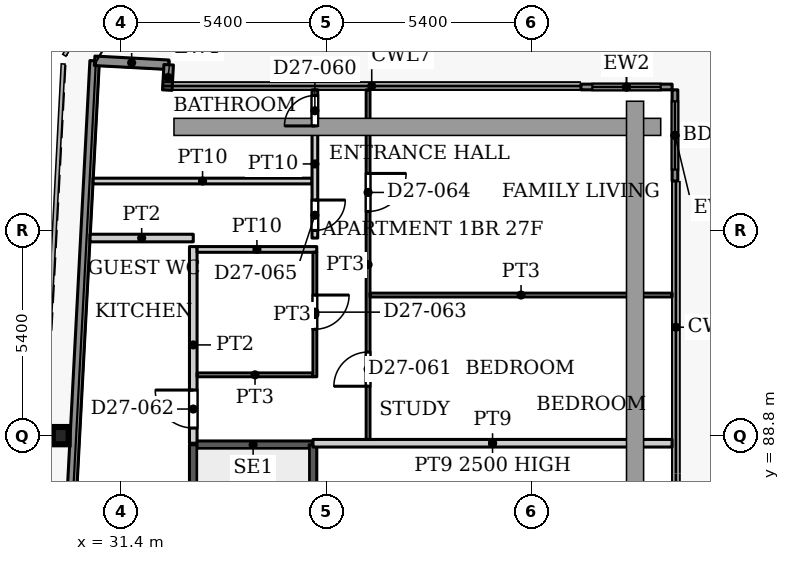
"""IFC4 building model, lengths in metres.
Left out: names, types, materials, properties, quantities, classifications, styles, units other than length and angle.
Written with IfcOpenShell. Run it as: python <this file> out.ifc"""

import sys

from ifc_helpers import new_model, si_unit, direction, frame, frame_2d, origin, origin_2d, place, context, subcontext, project, spatial, rectangle, i_section, extrude, source, transform, mapped, element, fill, save


model = new_model("IFC4")
c1 = context("Model", 3, precision=1e-05, world=origin(), true_north=direction((0.0, 1.0)))
c2 = subcontext(c1, "Body", "Model", "MODEL_VIEW")
j1 = project(units=[si_unit("LENGTHUNIT", "METRE"), si_unit("PLANEANGLEUNIT", "RADIAN")], contexts=[c1])
p1 = place(None, origin())
s1 = spatial("IfcSite", under=j1, at=p1, CompositionType="ELEMENT")
p2 = place(p1, origin())
s2 = spatial("IfcBuilding", under=s1, at=p2, CompositionType="ELEMENT")
p3 = place(p2, frame((0.0, 0.0, 117.5)))
s3 = spatial("IfcBuildingStorey", under=s2, at=p3, CompositionType="ELEMENT", Elevation=117.5)
p4 = place(p3, frame((29.811, 88.8, 0.0), z_axis=(0.0, 0.0, 1.0), x_axis=(1.0, 0.0, 0.0)))
e1 = element("IfcColumn", 1, at=p4, inside=s3, PredefinedType="COLUMN", context=c2, shape_type="SweptSolid", body=[
    extrude(i_section(OverallWidth=0.418, OverallDepth=0.455, WebThickness=0.042, FlangeThickness=0.068, FilletRadius=0.014, at=origin_2d()), origin(), (0.0, 0.0, 1.0), 3.9),
])
p5 = place(p3, frame((27.195, 31.969, 0.0), z_axis=(0.0, 0.0, 1.0), x_axis=(0.052554995867, 0.998618031286, 0.0)))
e2 = element("IfcWall", 2, at=p5, inside=s3, PredefinedType="SOLIDWALL", context=c2, shape_type="SweptSolid", body=[
    extrude(rectangle(XDim=66.787, YDim=0.25, at=frame_2d((33.394, 0.0))), origin(), (0.0, 0.0, 1.0), 3.75),
])
p6 = place(p3, frame((30.705, 98.664, 0.0), z_axis=(0.0, 0.0, 1.0), x_axis=(0.998577785791, -0.053314216913, 0.0)))
e3 = element("IfcWall", 3, at=p6, inside=s3, PredefinedType="SOLIDWALL", context=c2, shape_type="SweptSolid", body=[
    extrude(rectangle(XDim=1.951, YDim=0.25, at=frame_2d((0.975, 0.0))), origin(), (0.0, 0.0, 1.0), 3.75),
])
p7 = place(p3, frame((32.653, 98.56, 0.0), z_axis=(0.0, 0.0, 1.0), x_axis=(-0.054093451632, -0.998535877418, 0.0)))
e4 = element("IfcWall", 4, at=p7, inside=s3, PredefinedType="SOLIDWALL", context=c2, shape_type="SweptSolid", body=[
    extrude(rectangle(XDim=0.668, YDim=0.25, at=frame_2d((0.334, 0.0))), origin(), (0.0, 0.0, 1.0), 3.75),
])
p8 = place(p3, frame((43.5, 97.975, 0.0), z_axis=(0.0, 0.0, 1.0), x_axis=(1.0, 0.0, 0.0)))
e5 = element("IfcWall", 5, at=p8, inside=s3, PredefinedType="SOLIDWALL", context=c2, shape_type="SweptSolid", body=[
    extrude(rectangle(XDim=2.4, YDim=0.15, at=frame_2d((1.2, 0.0))), origin(), (0.0, 0.0, 1.0), 3.75),
])
p9 = place(p8, frame((0.3, 0.0, 0.0)))
e6 = element("IfcOpeningElement", 6, at=p9, cuts=e5, PredefinedType="OPENING", context=c2, shape_type="SweptSolid", body=[
    extrude(rectangle(XDim=1.8, YDim=2.4, at=frame_2d((0.9, 1.2))), frame((0.0, 0.085, 0.0), z_axis=(0.0, -1.0, 0.0), x_axis=(1.0, 0.0, 0.0)), (0.0, 0.0, 1.0), 0.17),
])
p10 = place(p3, frame((45.975, 97.9, 0.0), z_axis=(0.0, 0.0, 1.0), x_axis=(0.0, -1.0, 0.0)))
e7 = element("IfcWall", 7, at=p10, inside=s3, PredefinedType="SOLIDWALL", context=c2, shape_type="SweptSolid", body=[
    extrude(rectangle(XDim=2.4, YDim=0.15, at=frame_2d((1.2, 0.0))), origin(), (0.0, 0.0, 1.0), 3.75),
])
p11 = place(p10, frame((0.3, 0.0, 0.0)))
e8 = element("IfcOpeningElement", 8, at=p11, cuts=e7, PredefinedType="OPENING", context=c2, shape_type="SweptSolid", body=[
    extrude(rectangle(XDim=1.8, YDim=2.4, at=frame_2d((0.9, 1.2))), frame((0.0, 0.085, 0.0), z_axis=(0.0, -1.0, 0.0), x_axis=(1.0, 0.0, 0.0)), (0.0, 0.0, 1.0), 0.17),
])
p12 = place(p3, frame((33.3, 88.56, 0.0), z_axis=(0.0, 0.0, 1.0), x_axis=(1.0, 0.0, 0.0)))
e9 = element("IfcWall", 9, at=p12, inside=s3, PredefinedType="SHEAR", context=c2, shape_type="SweptSolid", body=[
    extrude(rectangle(XDim=3.15, YDim=0.2, at=frame_2d((1.575, 0.0))), origin(), (0.0, 0.0, 1.0), 3.9),
])
p13 = place(p3, frame((33.3, 79.4, 0.0), z_axis=(0.0, 0.0, 1.0), x_axis=(0.0, 1.0, 0.0)))
e10 = element("IfcWall", 10, at=p13, inside=s3, PredefinedType="SHEAR", context=c2, shape_type="SweptSolid", body=[
    extrude(rectangle(XDim=9.16, YDim=0.2, at=frame_2d((4.58, 0.0))), origin(), (0.0, 0.0, 1.0), 3.9),
])
p14 = place(p13, frame((0.35, 0.0, 0.0)))
e11 = element("IfcOpeningElement", 11, at=p14, cuts=e10, PredefinedType="OPENING", context=c2, shape_type="SweptSolid", body=[
    extrude(rectangle(XDim=1.1, YDim=2.2, at=frame_2d((0.55, 1.1))), frame((0.0, 0.11, 0.0), z_axis=(0.0, -1.0, 0.0), x_axis=(1.0, 0.0, 0.0)), (0.0, 0.0, 1.0), 0.22),
])
p15 = place(p3, frame((36.45, 79.4, 0.0), z_axis=(0.0, 0.0, 1.0), x_axis=(0.0, 1.0, 0.0)))
e12 = element("IfcWall", 12, at=p15, inside=s3, PredefinedType="SHEAR", context=c2, shape_type="SweptSolid", body=[
    extrude(rectangle(XDim=9.16, YDim=0.2, at=frame_2d((4.58, 0.0))), origin(), (0.0, 0.0, 1.0), 3.9),
])
p16 = place(p3, frame((30.664, 95.5, 0.0), z_axis=(0.0, 0.0, 1.0), x_axis=(1.0, 0.0, 0.0)))
e13 = element("IfcWall", 13, at=p16, inside=s3, PredefinedType="PARTITIONING", context=c2, shape_type="SweptSolid", body=[
    extrude(rectangle(XDim=5.761, YDim=0.15, at=frame_2d((2.88, 0.0))), origin(), (0.0, 0.0, 1.0), 3.6),
])
p17 = place(p3, frame((30.585, 94.0, 0.0), z_axis=(0.0, 0.0, 1.0), x_axis=(1.0, 0.0, 0.0)))
e14 = element("IfcWall", 14, at=p17, inside=s3, PredefinedType="PARTITIONING", context=c2, shape_type="SweptSolid", body=[
    extrude(rectangle(XDim=2.715, YDim=0.2, at=frame_2d((1.358, 0.0))), origin(), (0.0, 0.0, 1.0), 3.6),
])
p18 = place(p3, frame((33.3, 88.6, 0.0), z_axis=(0.0, 0.0, 1.0), x_axis=(0.0, 1.0, 0.0)))
e15 = element("IfcWall", 15, at=p18, inside=s3, PredefinedType="PARTITIONING", context=c2, shape_type="SweptSolid", body=[
    extrude(rectangle(XDim=5.175, YDim=0.2, at=frame_2d((2.587, 0.0))), origin(), (0.0, 0.0, 1.0), 3.6),
])
p19 = place(p18, frame((0.4, 0.0, 0.0)))
e16 = element("IfcOpeningElement", 16, at=p19, cuts=e15, PredefinedType="OPENING", context=c2, shape_type="SweptSolid", body=[
    extrude(rectangle(XDim=1.0, YDim=2.1, at=frame_2d((0.5, 1.05))), frame((0.0, 0.11, 0.0), z_axis=(0.0, -1.0, 0.0), x_axis=(1.0, 0.0, 0.0)), (0.0, 0.0, 1.0), 0.22),
])
p20 = place(p3, frame((33.4, 90.4, 0.0), z_axis=(0.0, 0.0, 1.0), x_axis=(1.0, 0.0, 0.0)))
e17 = element("IfcWall", 17, at=p20, inside=s3, PredefinedType="PARTITIONING", context=c2, shape_type="SweptSolid", body=[
    extrude(rectangle(XDim=3.05, YDim=0.1, at=frame_2d((1.525, 0.0))), origin(), (0.0, 0.0, 1.0), 3.6),
])
p21 = place(p3, frame((33.4, 93.7, 0.0), z_axis=(0.0, 0.0, 1.0), x_axis=(1.0, 0.0, 0.0)))
e18 = element("IfcWall", 18, at=p21, inside=s3, PredefinedType="PARTITIONING", context=c2, shape_type="SweptSolid", body=[
    extrude(rectangle(XDim=3.15, YDim=0.15, at=frame_2d((1.575, 0.0))), origin(), (0.0, 0.0, 1.0), 3.6),
])
p22 = place(p3, frame((36.45, 88.6, 0.0), z_axis=(0.0, 0.0, 1.0), x_axis=(1.0, 0.0, 0.0)))
e19 = element("IfcWall", 19, at=p22, inside=s3, PredefinedType="PARTITIONING", context=c2, shape_type="SweptSolid", body=[
    extrude(rectangle(XDim=9.45, YDim=0.2, at=frame_2d((4.725, 0.0))), origin(), (0.0, 0.0, 1.0), 2.5),
])
p23 = place(p3, frame((36.5, 90.35, 0.0), z_axis=(0.0, 0.0, 1.0), x_axis=(0.0, 1.0, 0.0)))
e20 = element("IfcWall", 20, at=p23, inside=s3, PredefinedType="PARTITIONING", context=c2, shape_type="SweptSolid", body=[
    extrude(rectangle(XDim=3.275, YDim=0.1, at=frame_2d((1.637, 0.0))), origin(), (0.0, 0.0, 1.0), 3.6),
])
p24 = place(p23, frame((1.25, 0.0, 0.0)))
e21 = element("IfcOpeningElement", 21, at=p24, cuts=e20, PredefinedType="OPENING", context=c2, shape_type="SweptSolid", body=[
    extrude(rectangle(XDim=0.9, YDim=2.1, at=frame_2d((0.45, 1.05))), frame((0.0, 0.06, 0.0), z_axis=(0.0, -1.0, 0.0), x_axis=(1.0, 0.0, 0.0)), (0.0, 0.0, 1.0), 0.12),
])
p25 = place(p3, frame((36.5, 94.0, 0.0), z_axis=(0.0, 0.0, 1.0), x_axis=(0.0, 1.0, 0.0)))
e22 = element("IfcWall", 22, at=p25, inside=s3, PredefinedType="PARTITIONING", context=c2, shape_type="SweptSolid", body=[
    extrude(rectangle(XDim=3.9, YDim=0.15, at=frame_2d((1.95, 0.0))), origin(), (0.0, 0.0, 1.0), 3.6),
])
p26 = place(p25, frame((2.95, 0.0, 0.0)))
e23 = element("IfcOpeningElement", 23, at=p26, cuts=e22, PredefinedType="OPENING", context=c2, shape_type="SweptSolid", body=[
    extrude(rectangle(XDim=0.8, YDim=2.1, at=frame_2d((0.4, 1.05))), frame((0.0, 0.085, 0.0), z_axis=(0.0, -1.0, 0.0), x_axis=(1.0, 0.0, 0.0)), (0.0, 0.0, 1.0), 0.17),
])
p27 = place(p25, frame((0.2, 0.0, 0.0)))
e24 = element("IfcOpeningElement", 24, at=p27, cuts=e22, PredefinedType="OPENING", context=c2, shape_type="SweptSolid", body=[
    extrude(rectangle(XDim=0.8, YDim=2.1, at=frame_2d((0.4, 1.05))), frame((0.0, 0.085, 0.0), z_axis=(0.0, -1.0, 0.0), x_axis=(1.0, 0.0, 0.0)), (0.0, 0.0, 1.0), 0.17),
])
p28 = place(p3, frame((37.9, 88.7, 0.0), z_axis=(0.0, 0.0, 1.0), x_axis=(0.0, 1.0, 0.0)))
e25 = element("IfcWall", 25, at=p28, inside=s3, PredefinedType="PARTITIONING", context=c2, shape_type="SweptSolid", body=[
    extrude(rectangle(XDim=9.2, YDim=0.1, at=frame_2d((4.6, 0.0))), origin(), (0.0, 0.0, 1.0), 3.6),
])
p29 = place(p28, frame((1.4, 0.0, 0.0)))
e26 = element("IfcOpeningElement", 26, at=p29, cuts=e25, PredefinedType="OPENING", context=c2, shape_type="SweptSolid", body=[
    extrude(rectangle(XDim=0.9, YDim=2.1, at=frame_2d((0.45, 1.05))), frame((0.0, 0.06, 0.0), z_axis=(0.0, -1.0, 0.0), x_axis=(1.0, 0.0, 0.0)), (0.0, 0.0, 1.0), 0.12),
])
p30 = place(p28, frame((6.0, 0.0, 0.0)))
e27 = element("IfcOpeningElement", 27, at=p30, cuts=e25, PredefinedType="OPENING", context=c2, shape_type="SweptSolid", body=[
    extrude(rectangle(XDim=1.0, YDim=2.1, at=frame_2d((0.5, 1.05))), frame((0.0, 0.06, 0.0), z_axis=(0.0, -1.0, 0.0), x_axis=(1.0, 0.0, 0.0)), (0.0, 0.0, 1.0), 0.12),
])
p31 = place(p3, frame((37.95, 92.5, 0.0), z_axis=(0.0, 0.0, 1.0), x_axis=(1.0, 0.0, 0.0)))
e28 = element("IfcWall", 28, at=p31, inside=s3, PredefinedType="PARTITIONING", context=c2, shape_type="SweptSolid", body=[
    extrude(rectangle(XDim=7.95, YDim=0.1, at=frame_2d((3.975, 0.0))), origin(), (0.0, 0.0, 1.0), 3.6),
])
m1 = source(origin(), c2, "Body", "SweptSolid", [
    extrude(rectangle(XDim=1.8, YDim=2.4, at=frame_2d((0.9, 1.2))), frame((0.0, 0.025, 0.0), z_axis=(0.0, -1.0, 0.0), x_axis=(1.0, 0.0, 0.0)), (0.0, 0.0, 1.0), 0.05),
])
p32 = place(p9, origin())
e29 = element("IfcDoor", 29, at=p32, inside=s3, OperationType="SLIDING_TO_LEFT", PredefinedType="DOOR", context=c2, shape_type="MappedRepresentation", body=[
    mapped(m1, transform((0.0, 0.0, 0.0), x_axis=(1.0, 0.0, 0.0), y_axis=(0.0, 1.0, 0.0), z_axis=(0.0, 0.0, 1.0), scale=1.0)),
])
fill(e6, e29)
p33 = place(p11, origin())
e30 = element("IfcDoor", 30, at=p33, inside=s3, OperationType="SLIDING_TO_LEFT", PredefinedType="DOOR", context=c2, shape_type="MappedRepresentation", body=[
    mapped(m1, transform((0.0, 0.0, 0.0), x_axis=(1.0, 0.0, 0.0), y_axis=(0.0, 1.0, 0.0), z_axis=(0.0, 0.0, 1.0), scale=1.0)),
])
fill(e8, e30)
m2 = source(origin(), c2, "Body", "SweptSolid", [
    extrude(rectangle(XDim=0.8, YDim=2.1, at=frame_2d((0.4, 1.05))), frame((0.0, 0.025, 0.0), z_axis=(0.0, -1.0, 0.0), x_axis=(1.0, 0.0, 0.0)), (0.0, 0.0, 1.0), 0.05),
])
p34 = place(p26, origin())
e31 = element("IfcDoor", 31, at=p34, inside=s3, OperationType="SINGLE_SWING_LEFT", PredefinedType="DOOR", context=c2, shape_type="MappedRepresentation", body=[
    mapped(m2, transform((0.0, 0.0, 0.0), x_axis=(1.0, 0.0, 0.0), y_axis=(0.0, 1.0, 0.0), z_axis=(0.0, 0.0, 1.0), scale=1.0)),
])
fill(e23, e31)
m3 = source(origin(), c2, "Body", "SweptSolid", [
    extrude(rectangle(XDim=0.9, YDim=2.1, at=frame_2d((0.45, 1.05))), frame((0.0, 0.025, 0.0), z_axis=(0.0, -1.0, 0.0), x_axis=(1.0, 0.0, 0.0)), (0.0, 0.0, 1.0), 0.05),
])
p35 = place(p29, origin())
e32 = element("IfcDoor", 32, at=p35, inside=s3, OperationType="SINGLE_SWING_LEFT", PredefinedType="DOOR", context=c2, shape_type="MappedRepresentation", body=[
    mapped(m3, transform((0.0, 0.0, 0.0), x_axis=(1.0, 0.0, 0.0), y_axis=(0.0, 1.0, 0.0), z_axis=(0.0, 0.0, 1.0), scale=1.0)),
])
fill(e26, e32)
m4 = source(origin(), c2, "Body", "SweptSolid", [
    extrude(rectangle(XDim=1.0, YDim=2.1, at=frame_2d((0.5, 1.05))), frame((0.0, 0.025, 0.0), z_axis=(0.0, -1.0, 0.0), x_axis=(1.0, 0.0, 0.0)), (0.0, 0.0, 1.0), 0.05),
])
p36 = place(p19, origin())
e33 = element("IfcDoor", 33, at=p36, inside=s3, OperationType="SINGLE_SWING_LEFT", PredefinedType="DOOR", context=c2, shape_type="MappedRepresentation", body=[
    mapped(m4, transform((0.0, 0.0, 0.0), x_axis=(1.0, 0.0, 0.0), y_axis=(0.0, 1.0, 0.0), z_axis=(0.0, 0.0, 1.0), scale=1.0)),
])
fill(e16, e33)
p37 = place(p24, origin())
e34 = element("IfcDoor", 34, at=p37, inside=s3, OperationType="SINGLE_SWING_RIGHT", PredefinedType="DOOR", context=c2, shape_type="MappedRepresentation", body=[
    mapped(m3, transform((0.0, 0.0, 0.0), x_axis=(1.0, 0.0, 0.0), y_axis=(0.0, 1.0, 0.0), z_axis=(0.0, 0.0, 1.0), scale=1.0)),
])
fill(e21, e34)
m5 = source(origin(), c2, "Body", "SweptSolid", [
    extrude(rectangle(XDim=1.0, YDim=2.1, at=frame_2d((0.5, 1.05))), frame((0.0, 0.025, 0.0), z_axis=(0.0, -1.0, 0.0), x_axis=(1.0, 0.0, 0.0)), (0.0, 0.0, 1.0), 0.05),
])
p38 = place(p30, origin())
e35 = element("IfcDoor", 35, at=p38, inside=s3, OperationType="SINGLE_SWING_RIGHT", PredefinedType="DOOR", context=c2, shape_type="MappedRepresentation", body=[
    mapped(m5, transform((0.0, 0.0, 0.0), x_axis=(1.0, 0.0, 0.0), y_axis=(0.0, 1.0, 0.0), z_axis=(0.0, 0.0, 1.0), scale=1.0)),
])
fill(e27, e35)
p39 = place(p27, origin())
e36 = element("IfcDoor", 36, at=p39, inside=s3, OperationType="SINGLE_SWING_RIGHT", PredefinedType="DOOR", context=c2, shape_type="MappedRepresentation", body=[
    mapped(m2, transform((0.0, 0.0, 0.0), x_axis=(1.0, 0.0, 0.0), y_axis=(0.0, 1.0, 0.0), z_axis=(0.0, 0.0, 1.0), scale=1.0)),
])
fill(e24, e36)
save(model, sys.argv[1])
